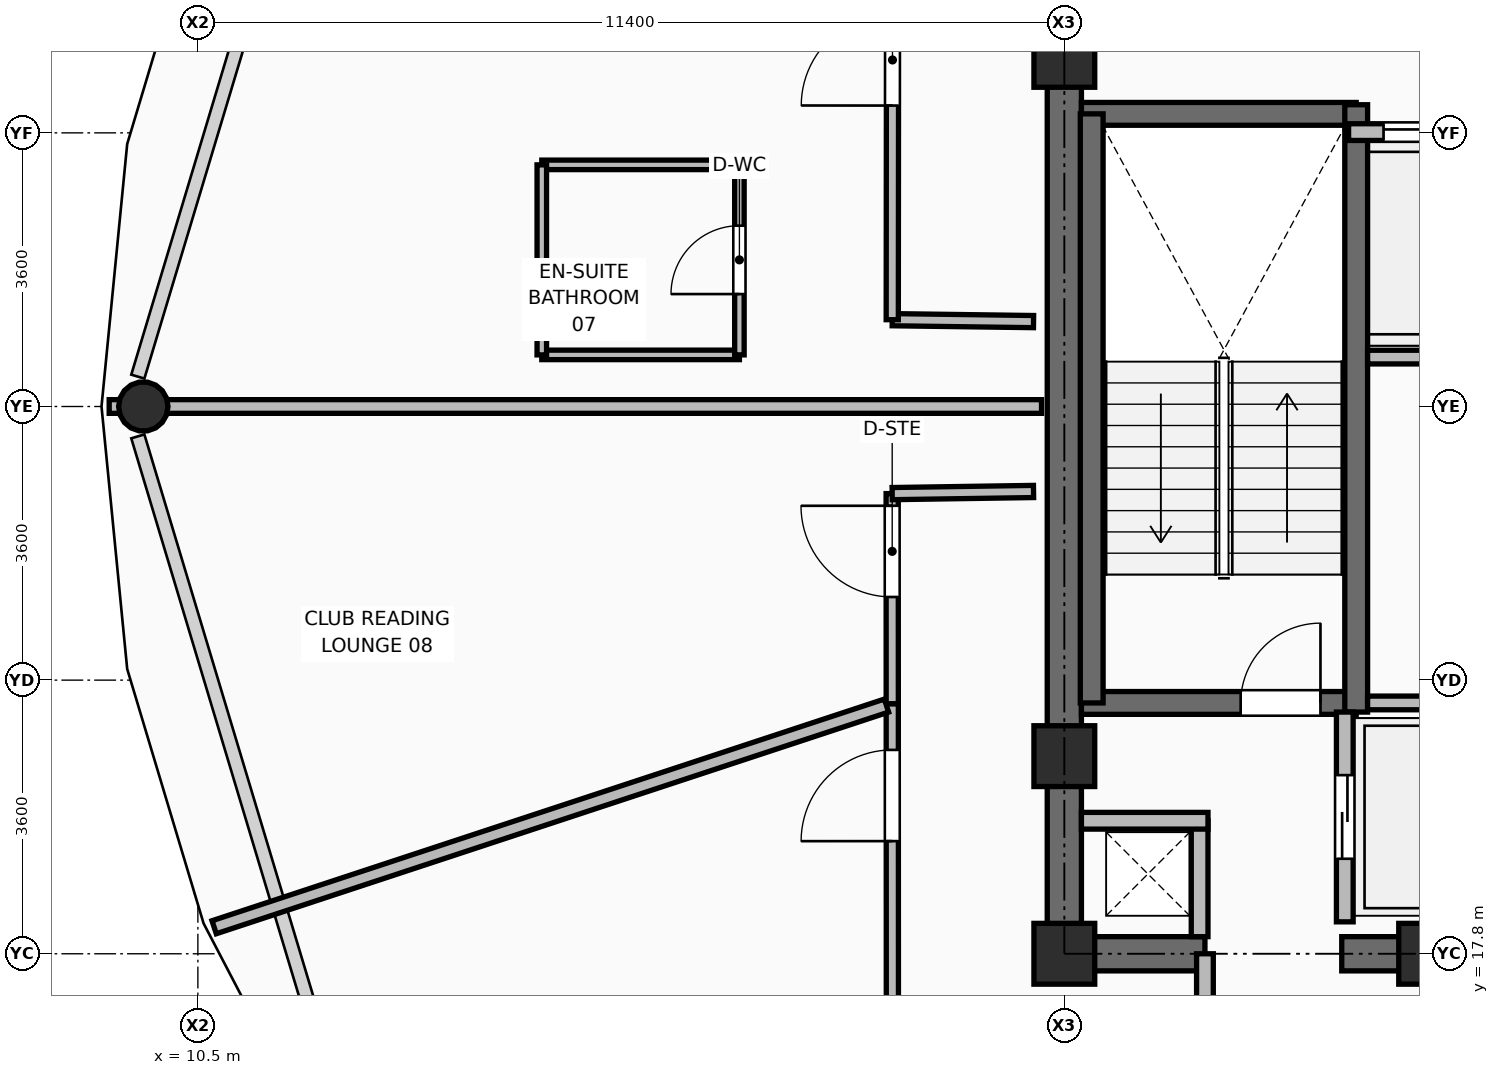
"""IFC4 building model, lengths in metres.
Left out: names, types, materials, properties, quantities, classifications, styles, units other than length and angle.
Written with IfcOpenShell. Run it as: python <this file> out.ifc"""

import sys

from ifc_helpers import new_model, si_unit, direction, frame, frame_2d, origin, origin_2d, place, context, subcontext, project, spatial, rectangle, hollow_circle, extrude, element, fill, save


model = new_model("IFC4")
c1 = context("Model", 3, precision=1e-05, world=origin(), true_north=direction((0.0, 1.0)))
c2 = subcontext(c1, "Body", "Model", "MODEL_VIEW")
j1 = project(units=[si_unit("LENGTHUNIT", "METRE"), si_unit("PLANEANGLEUNIT", "RADIAN")], contexts=[c1])
p1 = place(None, origin())
s1 = spatial("IfcSite", under=j1, at=p1, CompositionType="ELEMENT")
p2 = place(p1, origin())
s2 = spatial("IfcBuilding", under=s1, at=p2, CompositionType="ELEMENT")
p3 = place(p2, frame((0.0, 0.0, 249.9)))
s3 = spatial("IfcBuildingStorey", under=s2, at=p3, CompositionType="ELEMENT", Elevation=249.9)
for number, where, z_axis, x_axis in (
    (1, (21.9, 17.8, 0.0), (0.0, 0.0, 1.0), (1.0, 0.0, 0.0)),
    (2, (26.7, 17.8, 0.0), (0.0, 0.0, 1.0), (1.0, 0.0, 0.0)),
    (3, (21.9, 20.4, 0.0), (0.0, 0.0, 1.0), (1.0, 0.0, 0.0)),
    (4, (21.9, 29.6, 0.0), (0.0, 0.0, 1.0), (1.0, 0.0, 0.0)),
):
    element("IfcColumn", number, at=place(p3, frame(where, z_axis=z_axis, x_axis=x_axis)), inside=s3, PredefinedType="COLUMN", context=c2, shape_type="SweptSolid", body=[
        extrude(rectangle(XDim=0.8, YDim=0.8, at=origin_2d()), origin(), (0.0, 0.0, 1.0), 3.75),
    ])
p4 = place(p3, frame((9.782, 25.0, 0.0), z_axis=(0.104543948341, 0.0, 0.9945202677), x_axis=(0.0, 1.0, 0.0)))
e5 = element("IfcColumn", 5, at=p4, inside=s3, PredefinedType="COLUMN", context=c2, shape_type="SweptSolid", body=[
    extrude(hollow_circle(Radius=0.325, WallThickness=0.03, at=origin_2d()), origin(), (0.0, 0.0, 1.0), 3.519),
])
p5 = place(p3, frame((21.675, 17.8, 0.0), z_axis=(0.0, 0.0, 1.0), x_axis=(1.0, 0.0, 0.0)))
e6 = element("IfcWall", 6, at=p5, inside=s3, PredefinedType="SHEAR", context=c2, shape_type="SweptSolid", body=[
    extrude(rectangle(XDim=2.075, YDim=0.45, at=frame_2d((1.038, 0.0))), origin(), (0.0, 0.0, 1.0), 3.5),
])
p6 = place(p3, frame((25.55, 17.8, 0.0), z_axis=(0.0, 0.0, 1.0), x_axis=(1.0, 0.0, 0.0)))
e7 = element("IfcWall", 7, at=p6, inside=s3, PredefinedType="SHEAR", context=c2, shape_type="SweptSolid", body=[
    extrude(rectangle(XDim=6.9, YDim=0.45, at=frame_2d((3.45, 0.0))), origin(), (0.0, 0.0, 1.0), 3.5),
])
p7 = place(p3, frame((21.9, 18.025, 0.0), z_axis=(0.0, 0.0, 1.0), x_axis=(0.0, 1.0, 0.0)))
e8 = element("IfcWall", 8, at=p7, inside=s3, PredefinedType="SHEAR", context=c2, shape_type="SweptSolid", body=[
    extrude(rectangle(XDim=14.2, YDim=0.45, at=frame_2d((7.1, 0.0))), origin(), (0.0, 0.0, 1.0), 3.5),
])
p8 = place(p3, frame((22.125, 21.1, 0.0), z_axis=(0.0, 0.0, 1.0), x_axis=(1.0, 0.0, 0.0)))
e9 = element("IfcWall", 9, at=p8, inside=s3, PredefinedType="SHEAR", context=c2, shape_type="SweptSolid", body=[
    extrude(rectangle(XDim=3.615, YDim=0.3, at=frame_2d((1.808, 0.0))), origin(), (0.0, 0.0, 1.0), 3.5),
])
p9 = place(p8, frame((2.095, 0.0, 0.0)))
e10 = element("IfcOpeningElement", 10, at=p9, cuts=e9, PredefinedType="OPENING", context=c2, shape_type="SweptSolid", body=[
    extrude(rectangle(XDim=1.05, YDim=2.1, at=frame_2d((0.525, 1.05))), frame((0.0, 0.16, 0.0), z_axis=(0.0, -1.0, 0.0), x_axis=(1.0, 0.0, 0.0)), (0.0, 0.0, 1.0), 0.32),
])
p10 = place(p3, frame((22.125, 28.85, 0.0), z_axis=(0.0, 0.0, 1.0), x_axis=(1.0, 0.0, 0.0)))
e11 = element("IfcWall", 11, at=p10, inside=s3, PredefinedType="SHEAR", context=c2, shape_type="SweptSolid", body=[
    extrude(rectangle(XDim=3.615, YDim=0.3, at=frame_2d((1.808, 0.0))), origin(), (0.0, 0.0, 1.0), 3.5),
])
p11 = place(p3, frame((25.74, 20.98, 0.0), z_axis=(0.0, 0.0, 1.0), x_axis=(0.0, 1.0, 0.0)))
e12 = element("IfcWall", 12, at=p11, inside=s3, PredefinedType="SHEAR", context=c2, shape_type="SweptSolid", body=[
    extrude(rectangle(XDim=7.99, YDim=0.3, at=frame_2d((3.995, 0.0))), origin(), (0.0, 0.0, 1.0), 3.5),
])
p12 = place(p3, frame((22.26, 21.1, 0.0), z_axis=(0.0, 0.0, 1.0), x_axis=(0.0, 1.0, 0.0)))
e13 = element("IfcWall", 13, at=p12, inside=s3, PredefinedType="SHEAR", context=c2, shape_type="SweptSolid", body=[
    extrude(rectangle(XDim=7.75, YDim=0.3, at=frame_2d((3.875, 0.0))), origin(), (0.0, 0.0, 1.0), 3.5),
])
p13 = place(p3, frame((23.68, 18.025, 0.0), z_axis=(0.0, 0.0, 1.0), x_axis=(0.0, 1.0, 0.0)))
e14 = element("IfcWall", 14, at=p13, inside=s3, PredefinedType="PARTITIONING", context=c2, shape_type="SweptSolid", body=[
    extrude(rectangle(XDim=1.525, YDim=0.22, at=frame_2d((0.763, 0.0))), origin(), (0.0, 0.0, 1.0), 3.48),
])
p14 = place(p3, frame((22.125, 19.55, 0.0), z_axis=(0.0, 0.0, 1.0), x_axis=(1.0, 0.0, 0.0)))
e15 = element("IfcWall", 15, at=p14, inside=s3, PredefinedType="PARTITIONING", context=c2, shape_type="SweptSolid", body=[
    extrude(rectangle(XDim=1.665, YDim=0.22, at=frame_2d((0.833, 0.0))), origin(), (0.0, 0.0, 1.0), 2.525),
])
p15 = place(p3, frame((25.59, 18.22, 0.0), z_axis=(0.0, 0.0, 1.0), x_axis=(0.0, 1.0, 0.0)))
e16 = element("IfcWall", 16, at=p15, inside=s3, PredefinedType="PARTITIONING", context=c2, shape_type="SweptSolid", body=[
    extrude(rectangle(XDim=2.76, YDim=0.22, at=frame_2d((1.38, 0.0))), origin(), (0.0, 0.0, 1.0), 3.48),
])
p16 = place(p15, frame((0.83, 0.0, 0.0)))
e17 = element("IfcOpeningElement", 17, at=p16, cuts=e16, PredefinedType="OPENING", context=c2, shape_type="SweptSolid", body=[
    extrude(rectangle(XDim=1.1, YDim=2.2, at=frame_2d((0.55, 1.1))), frame((0.0, 0.12, 0.0), z_axis=(0.0, -1.0, 0.0), x_axis=(1.0, 0.0, 0.0)), (0.0, 0.0, 1.0), 0.24),
])
p17 = place(p3, frame((25.64, 28.61, 0.0), z_axis=(0.0, 0.0, 1.0), x_axis=(1.0, 0.0, 0.0)))
e18 = element("IfcWall", 18, at=p17, inside=s3, PredefinedType="PARTITIONING", context=c2, shape_type="SweptSolid", body=[
    extrude(rectangle(XDim=2.02, YDim=0.22, at=frame_2d((1.01, 0.0))), origin(), (0.0, 0.0, 1.0), 3.48),
])
p18 = place(p17, frame((0.46, 0.0, 0.0)))
e19 = element("IfcOpeningElement", 19, at=p18, cuts=e18, PredefinedType="OPENING", context=c2, shape_type="SweptSolid", body=[
    extrude(rectangle(XDim=1.1, YDim=2.2, at=frame_2d((0.55, 1.1))), frame((0.0, 0.12, 0.0), z_axis=(0.0, -1.0, 0.0), x_axis=(1.0, 0.0, 0.0)), (0.0, 0.0, 1.0), 0.24),
])
for number, where, z_axis, x_axis in (
    (20, (25.89, 21.1, 0.0), (0.0, 0.0, 1.0), (1.0, 0.0, 0.0)),
    (21, (25.89, 25.65, 0.0), (0.0, 0.0, 1.0), (1.0, 0.0, 0.0)),
):
    element("IfcWall", number, at=place(p3, frame(where, z_axis=z_axis, x_axis=x_axis)), inside=s3, PredefinedType="PARTITIONING", context=c2, shape_type="SweptSolid", body=[
        extrude(rectangle(XDim=1.7, YDim=0.18, at=frame_2d((0.85, 0.0))), origin(), (0.0, 0.0, 1.0), 3.48),
    ])
p19 = place(p3, frame((23.75, 14.35, 0.0), z_axis=(0.0, 0.0, 1.0), x_axis=(0.0, 1.0, 0.0)))
e22 = element("IfcWall", 22, at=p19, inside=s3, PredefinedType="PARTITIONING", context=c2, shape_type="SweptSolid", body=[
    extrude(rectangle(XDim=3.45, YDim=0.22, at=frame_2d((1.725, 0.0))), origin(), (0.0, 0.0, 1.0), 3.012),
])
p20 = place(p3, frame((21.495, 26.117, 0.0), z_axis=(0.0, 0.0, 1.0), x_axis=(-0.999908537082, 0.013524698532, 0.0)))
e23 = element("IfcWall", 23, at=p20, inside=s3, PredefinedType="PARTITIONING", context=c2, shape_type="SweptSolid", body=[
    extrude(rectangle(XDim=1.859, YDim=0.16, at=frame_2d((0.93, 0.0))), origin(), (0.0, 0.0, 1.0), 2.525),
])
p21 = place(p3, frame((19.636, 26.142, 0.0), z_axis=(0.0, 0.0, 1.0), x_axis=(0.000899866207, 0.99999959512, 0.0)))
e24 = element("IfcWall", 24, at=p21, inside=s3, PredefinedType="PARTITIONING", context=c2, shape_type="SweptSolid", body=[
    extrude(rectangle(XDim=7.868, YDim=0.16, at=frame_2d((3.934, 0.0))), origin(), (0.0, 0.0, 1.0), 3.012),
])
p22 = place(p21, frame((2.817, 0.0, 0.0)))
e25 = element("IfcOpeningElement", 25, at=p22, cuts=e24, PredefinedType="OPENING", context=c2, shape_type="SweptSolid", body=[
    extrude(rectangle(XDim=1.2, YDim=2.1, at=frame_2d((0.6, 1.05))), frame((0.0, 0.09, 0.0), z_axis=(0.0, -1.0, 0.0), x_axis=(1.0, 0.0, 0.0)), (0.0, 0.0, 1.0), 0.18),
])
p23 = place(p3, frame((19.638, 15.986, 0.0), z_axis=(0.0, 0.0, 1.0), x_axis=(-0.000382665236, 0.999999926784, 0.0)))
e26 = element("IfcWall", 26, at=p23, inside=s3, PredefinedType="PARTITIONING", context=c2, shape_type="SweptSolid", body=[
    extrude(rectangle(XDim=5.104, YDim=0.16, at=frame_2d((2.552, 0.0))), origin(), (0.0, 0.0, 1.0), 3.012),
])
p24 = place(p23, frame((3.296, 0.0, 0.0)))
e27 = element("IfcOpeningElement", 27, at=p24, cuts=e26, PredefinedType="OPENING", context=c2, shape_type="SweptSolid", body=[
    extrude(rectangle(XDim=1.2, YDim=2.1, at=frame_2d((0.6, 1.05))), frame((0.0, 0.09, 0.0), z_axis=(0.0, -1.0, 0.0), x_axis=(1.0, 0.0, 0.0)), (0.0, 0.0, 1.0), 0.18),
])
p25 = place(p3, frame((19.636, 21.09, 0.0), z_axis=(0.0, 0.0, 1.0), x_axis=(-0.000353325656, 0.99999993758, 0.0)))
e28 = element("IfcWall", 28, at=p25, inside=s3, PredefinedType="PARTITIONING", context=c2, shape_type="SweptSolid", body=[
    extrude(rectangle(XDim=2.764, YDim=0.16, at=frame_2d((1.382, 0.0))), origin(), (0.0, 0.0, 1.0), 3.012),
])
p26 = place(p25, frame((1.404, 0.0, 0.0)))
e29 = element("IfcOpeningElement", 29, at=p26, cuts=e28, PredefinedType="OPENING", context=c2, shape_type="SweptSolid", body=[
    extrude(rectangle(XDim=1.2, YDim=2.1, at=frame_2d((0.6, 1.05))), frame((0.0, 0.09, 0.0), z_axis=(0.0, -1.0, 0.0), x_axis=(1.0, 0.0, 0.0)), (0.0, 0.0, 1.0), 0.18),
])
p27 = place(p3, frame((19.635, 23.854, 0.0), z_axis=(0.0, 0.0, 1.0), x_axis=(0.999886107392, 0.015092125259, 0.0)))
e30 = element("IfcWall", 30, at=p27, inside=s3, PredefinedType="PARTITIONING", context=c2, shape_type="SweptSolid", body=[
    extrude(rectangle(XDim=1.86, YDim=0.16, at=frame_2d((0.93, 0.0))), origin(), (0.0, 0.0, 1.0), 2.525),
])
p28 = place(p3, frame((21.6, 25.0, 0.0), z_axis=(0.0, 0.0, 1.0), x_axis=(-1.0, 0.0, 0.0)))
e31 = element("IfcWall", 31, at=p28, inside=s3, PredefinedType="PARTITIONING", context=c2, shape_type="SweptSolid", body=[
    extrude(rectangle(XDim=12.267, YDim=0.18, at=frame_2d((6.134, 0.0))), origin(), (0.0, 0.0, 1.0), 2.525),
])
p29 = place(p3, frame((19.56, 21.065, 0.0), z_axis=(0.0, 0.0, 1.0), x_axis=(-0.949729147415, -0.313072749613, 0.0)))
e32 = element("IfcWall", 32, at=p29, inside=s3, PredefinedType="PARTITIONING", context=c2, shape_type="SweptSolid", body=[
    extrude(rectangle(XDim=9.314, YDim=0.18, at=frame_2d((4.657, 0.0))), origin(), (0.0, 0.0, 1.0), 2.855),
])
for number, where, z_axis, x_axis in (
    (33, (15.025, 25.679, 0.0), (0.0, 0.0, 1.0), (1.0, 0.0, 0.0)),
    (34, (15.025, 28.179, 0.0), (0.0, 0.0, 1.0), (1.0, 0.0, 0.0)),
):
    element("IfcWall", number, at=place(p3, frame(where, z_axis=z_axis, x_axis=x_axis)), inside=s3, PredefinedType="PARTITIONING", context=c2, shape_type="SweptSolid", body=[
        extrude(rectangle(XDim=2.6, YDim=0.125, at=frame_2d((1.3, 0.0))), origin(), (0.0, 0.0, 1.0), 3.48),
    ])
p30 = place(p3, frame((15.025, 25.679, 0.0), z_axis=(0.0, 0.0, 1.0), x_axis=(0.0, 1.0, 0.0)))
e35 = element("IfcWall", 35, at=p30, inside=s3, PredefinedType="PARTITIONING", context=c2, shape_type="SweptSolid", body=[
    extrude(rectangle(XDim=2.5, YDim=0.125, at=frame_2d((1.25, 0.0))), origin(), (0.0, 0.0, 1.0), 3.48),
])
p31 = place(p3, frame((17.625, 25.679, 0.0), z_axis=(0.0, 0.0, 1.0), x_axis=(0.0, 1.0, 0.0)))
e36 = element("IfcWall", 36, at=p31, inside=s3, PredefinedType="PARTITIONING", context=c2, shape_type="SweptSolid", body=[
    extrude(rectangle(XDim=2.5, YDim=0.125, at=frame_2d((1.25, 0.0))), origin(), (0.0, 0.0, 1.0), 3.48),
])
p32 = place(p31, frame((0.8, 0.0, 0.0)))
e37 = element("IfcOpeningElement", 37, at=p32, cuts=e36, PredefinedType="OPENING", context=c2, shape_type="SweptSolid", body=[
    extrude(rectangle(XDim=0.9, YDim=2.1, at=frame_2d((0.45, 1.05))), frame((0.0, 0.073, 0.0), z_axis=(0.0, -1.0, 0.0), x_axis=(1.0, 0.0, 0.0)), (0.0, 0.0, 1.0), 0.145),
])
p33 = place(p9, origin())
e38 = element("IfcDoor", 38, at=p33, inside=s3, OperationType="SINGLE_SWING_RIGHT", PredefinedType="DOOR", context=c2, shape_type="SweptSolid", body=[
    extrude(rectangle(XDim=1.05, YDim=2.1, at=frame_2d((0.525, 1.05))), frame((0.0, 0.025, 0.0), z_axis=(0.0, -1.0, 0.0), x_axis=(1.0, 0.0, 0.0)), (0.0, 0.0, 1.0), 0.05),
])
fill(e10, e38)
p34 = place(p16, origin())
e39 = element("IfcDoor", 39, at=p34, inside=s3, OperationType="DOUBLE_DOOR_SLIDING", PredefinedType="DOOR", context=c2, shape_type="SweptSolid", body=[
    extrude(rectangle(XDim=1.1, YDim=2.2, at=frame_2d((0.55, 1.1))), frame((0.0, 0.025, 0.0), z_axis=(0.0, -1.0, 0.0), x_axis=(1.0, 0.0, 0.0)), (0.0, 0.0, 1.0), 0.05),
])
fill(e17, e39)
p35 = place(p18, origin())
e40 = element("IfcDoor", 40, at=p35, inside=s3, OperationType="DOUBLE_DOOR_SLIDING", PredefinedType="DOOR", context=c2, shape_type="SweptSolid", body=[
    extrude(rectangle(XDim=1.1, YDim=2.2, at=frame_2d((0.55, 1.1))), frame((0.0, 0.025, 0.0), z_axis=(0.0, -1.0, 0.0), x_axis=(1.0, 0.0, 0.0)), (0.0, 0.0, 1.0), 0.05),
])
fill(e19, e40)
p36 = place(p32, origin())
e41 = element("IfcDoor", 41, at=p36, inside=s3, OperationType="SINGLE_SWING_LEFT", PredefinedType="DOOR", context=c2, shape_type="SweptSolid", body=[
    extrude(rectangle(XDim=0.9, YDim=2.1, at=frame_2d((0.45, 1.05))), frame((0.0, 0.025, 0.0), z_axis=(0.0, -1.0, 0.0), x_axis=(1.0, 0.0, 0.0)), (0.0, 0.0, 1.0), 0.05),
])
fill(e37, e41)
p37 = place(p22, origin())
e42 = element("IfcDoor", 42, at=p37, inside=s3, OperationType="SINGLE_SWING_LEFT", PredefinedType="DOOR", context=c2, shape_type="SweptSolid", body=[
    extrude(rectangle(XDim=1.2, YDim=2.1, at=frame_2d((0.6, 1.05))), frame((0.0, 0.025, 0.0), z_axis=(0.0, -1.0, 0.0), x_axis=(1.0, 0.0, 0.0)), (0.0, 0.0, 1.0), 0.05),
])
fill(e25, e42)
p38 = place(p26, origin())
e43 = element("IfcDoor", 43, at=p38, inside=s3, OperationType="SINGLE_SWING_RIGHT", PredefinedType="DOOR", context=c2, shape_type="SweptSolid", body=[
    extrude(rectangle(XDim=1.2, YDim=2.1, at=frame_2d((0.6, 1.05))), frame((0.0, 0.025, 0.0), z_axis=(0.0, -1.0, 0.0), x_axis=(1.0, 0.0, 0.0)), (0.0, 0.0, 1.0), 0.05),
])
fill(e29, e43)
p39 = place(p24, origin())
e44 = element("IfcDoor", 44, at=p39, inside=s3, OperationType="SINGLE_SWING_LEFT", PredefinedType="DOOR", context=c2, shape_type="SweptSolid", body=[
    extrude(rectangle(XDim=1.2, YDim=2.1, at=frame_2d((0.6, 1.05))), frame((0.0, 0.025, 0.0), z_axis=(0.0, -1.0, 0.0), x_axis=(1.0, 0.0, 0.0)), (0.0, 0.0, 1.0), 0.05),
])
fill(e27, e44)
save(model, sys.argv[1])
